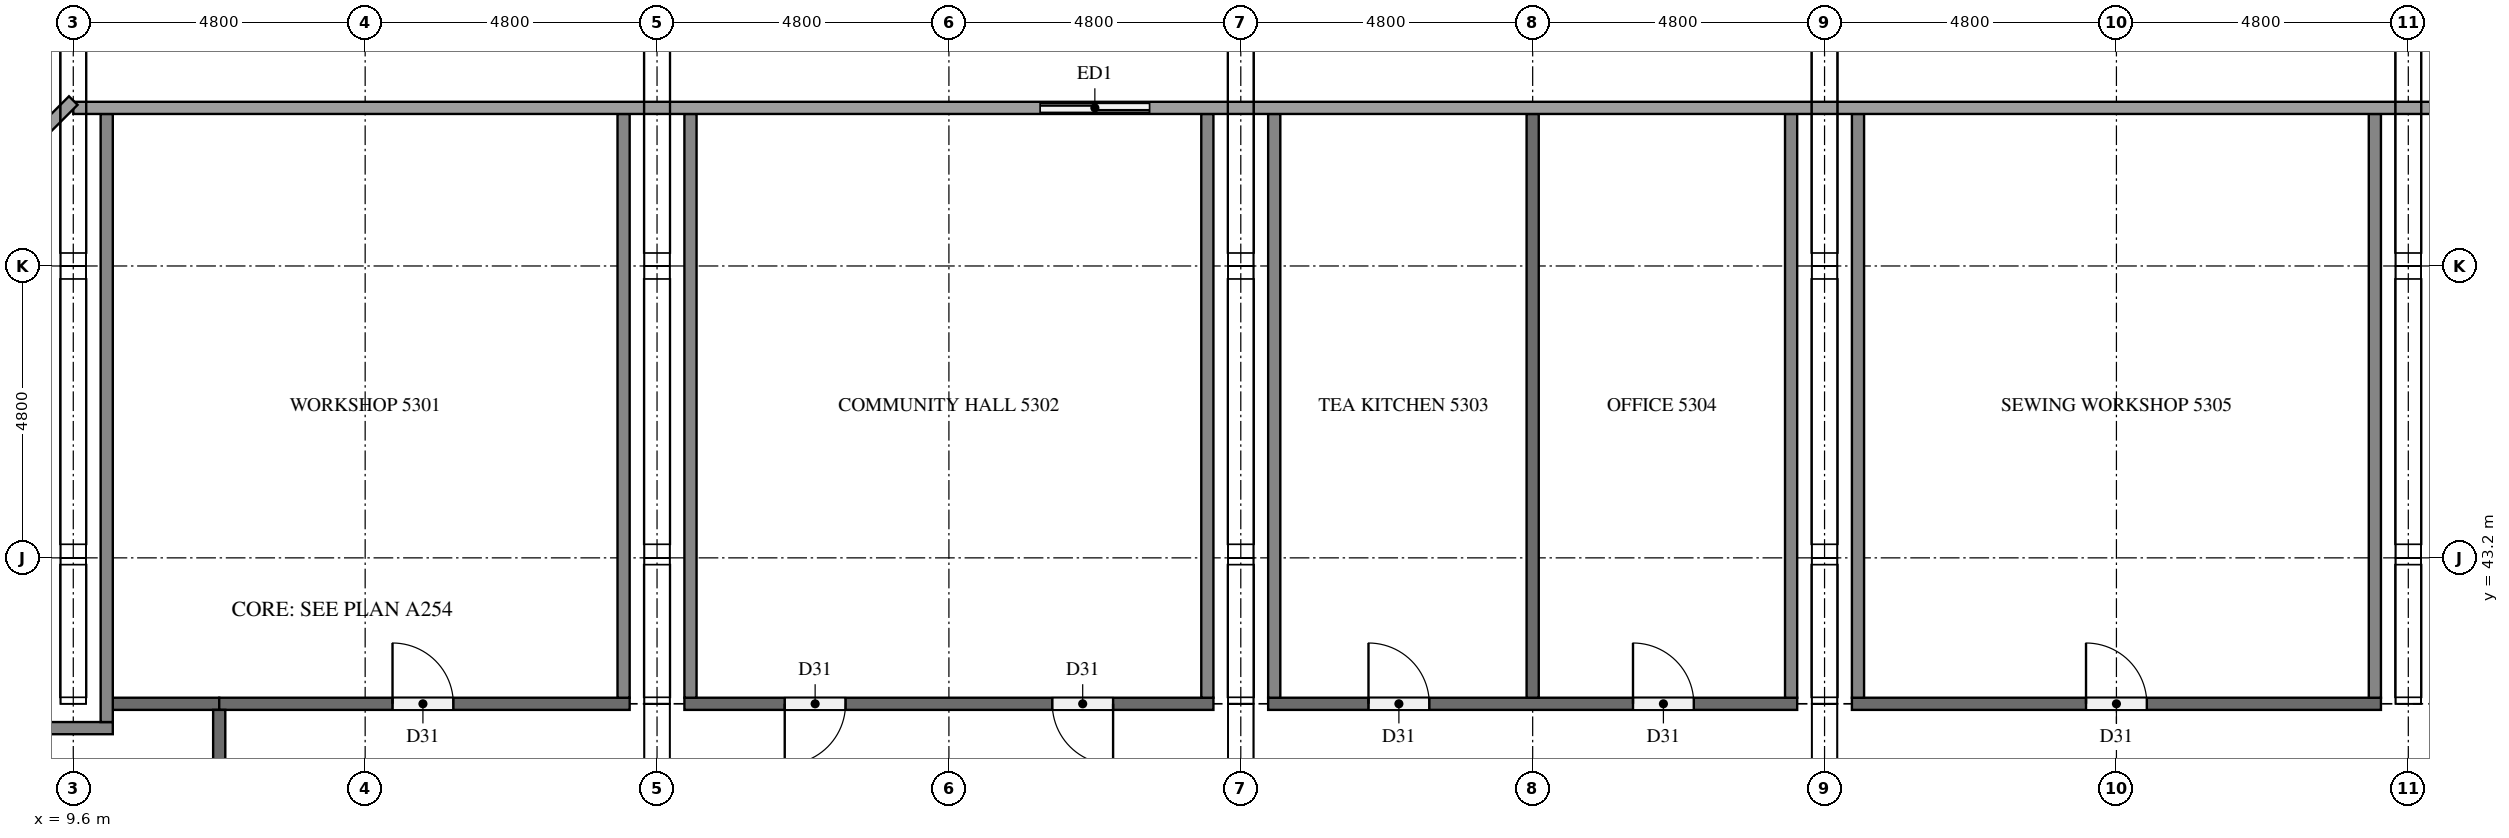
"""IFC4 building model, lengths in metres.
Left out: names, types, materials, properties, quantities, classifications, styles, units other than length and angle.
Written with IfcOpenShell. Run it as: python <this file> out.ifc"""

import sys

from ifc_helpers import new_model, si_unit, direction, frame, frame_2d, origin, place, context, subcontext, project, spatial, rectangle, extrude, element, fill, save


model = new_model("IFC4")
c1 = context("Model", 3, precision=1e-05, world=origin(), true_north=direction((0.0, 1.0)))
c2 = subcontext(c1, "Body", "Model", "MODEL_VIEW")
j1 = project(units=[si_unit("LENGTHUNIT", "METRE"), si_unit("PLANEANGLEUNIT", "RADIAN")], contexts=[c1])
p1 = place(None, origin())
s1 = spatial("IfcSite", under=j1, at=p1, CompositionType="ELEMENT")
p2 = place(p1, origin())
s2 = spatial("IfcBuilding", under=s1, at=p2, CompositionType="ELEMENT")
p3 = place(p2, frame((0.0, 0.0, 203.4)))
s3 = spatial("IfcBuildingStorey", under=s2, at=p3, CompositionType="ELEMENT", Elevation=203.4)
p4 = place(p3, frame((27.6, 50.6, 0.0), z_axis=(0.0, 0.0, 1.0), x_axis=(-1.0, 0.0, 0.0)))
e1 = element("IfcWall", 1, at=p4, inside=s3, PredefinedType="SOLIDWALL", context=c2, shape_type="SweptSolid", body=[
    extrude(rectangle(XDim=2.4, YDim=0.15, at=frame_2d((1.2, 0.0))), origin(), (0.0, 0.0, 1.0), 5.1),
])
p5 = place(p4, frame((0.3, 0.0, 0.0)))
e2 = element("IfcOpeningElement", 2, at=p5, cuts=e1, PredefinedType="OPENING", context=c2, shape_type="SweptSolid", body=[
    extrude(rectangle(XDim=1.8, YDim=2.4, at=frame_2d((0.9, 1.2))), frame((0.0, 0.085, 0.0), z_axis=(0.0, -1.0, 0.0), x_axis=(1.0, 0.0, 0.0)), (0.0, 0.0, 1.0), 0.17),
])
p6 = place(p3, frame((8.95, 40.4, 0.0), z_axis=(0.0, 0.0, 1.0), x_axis=(1.0, 0.0, 0.0)))
e3 = element("IfcWall", 3, at=p6, inside=s3, PredefinedType="PARTITIONING", context=c2, shape_type="SweptSolid", body=[
    extrude(rectangle(XDim=1.3, YDim=0.2, at=frame_2d((0.65, 0.0))), origin(), (0.0, 0.0, 1.0), 5.1),
])
p7 = place(p3, frame((10.25, 40.8, 0.0), z_axis=(0.0, 0.0, 1.0), x_axis=(1.0, 0.0, 0.0)))
e4 = element("IfcWall", 4, at=p7, inside=s3, PredefinedType="PARTITIONING", context=c2, shape_type="SweptSolid", body=[
    extrude(rectangle(XDim=1.75, YDim=0.2, at=frame_2d((0.875, 0.0))), origin(), (0.0, 0.0, 1.0), 5.1),
])
p8 = place(p3, frame((12.0, 40.8, 0.0), z_axis=(0.0, 0.0, 1.0), x_axis=(1.0, 0.0, 0.0)))
e5 = element("IfcWall", 5, at=p8, inside=s3, PredefinedType="PARTITIONING", context=c2, shape_type="SweptSolid", body=[
    extrude(rectangle(XDim=6.75, YDim=0.2, at=frame_2d((3.375, 0.0))), origin(), (0.0, 0.0, 1.0), 5.1),
])
p9 = place(p8, frame((2.85, 0.0, 0.0)))
e6 = element("IfcOpeningElement", 6, at=p9, cuts=e5, PredefinedType="OPENING", context=c2, shape_type="SweptSolid", body=[
    extrude(rectangle(XDim=1.0, YDim=2.1, at=frame_2d((0.5, 1.05))), frame((0.0, 0.11, 0.0), z_axis=(0.0, -1.0, 0.0), x_axis=(1.0, 0.0, 0.0)), (0.0, 0.0, 1.0), 0.22),
])
p10 = place(p3, frame((28.35, 40.8, 0.0), z_axis=(0.0, 0.0, 1.0), x_axis=(-1.0, 0.0, 0.0)))
e7 = element("IfcWall", 7, at=p10, inside=s3, PredefinedType="PARTITIONING", context=c2, shape_type="SweptSolid", body=[
    extrude(rectangle(XDim=8.7, YDim=0.2, at=frame_2d((4.35, 0.0))), origin(), (0.0, 0.0, 1.0), 5.1),
])
p11 = place(p10, frame((6.05, 0.0, 0.0)))
e8 = element("IfcOpeningElement", 8, at=p11, cuts=e7, PredefinedType="OPENING", context=c2, shape_type="SweptSolid", body=[
    extrude(rectangle(XDim=1.0, YDim=2.1, at=frame_2d((0.5, 1.05))), frame((0.0, 0.11, 0.0), z_axis=(0.0, -1.0, 0.0), x_axis=(1.0, 0.0, 0.0)), (0.0, 0.0, 1.0), 0.22),
])
p12 = place(p10, frame((1.65, 0.0, 0.0)))
e9 = element("IfcOpeningElement", 9, at=p12, cuts=e7, PredefinedType="OPENING", context=c2, shape_type="SweptSolid", body=[
    extrude(rectangle(XDim=1.0, YDim=2.1, at=frame_2d((0.5, 1.05))), frame((0.0, 0.11, 0.0), z_axis=(0.0, -1.0, 0.0), x_axis=(1.0, 0.0, 0.0)), (0.0, 0.0, 1.0), 0.22),
])
p13 = place(p3, frame((29.25, 40.8, 0.0), z_axis=(0.0, 0.0, 1.0), x_axis=(1.0, 0.0, 0.0)))
e10 = element("IfcWall", 10, at=p13, inside=s3, PredefinedType="PARTITIONING", context=c2, shape_type="SweptSolid", body=[
    extrude(rectangle(XDim=8.7, YDim=0.2, at=frame_2d((4.35, 0.0))), origin(), (0.0, 0.0, 1.0), 5.1),
])
p14 = place(p13, frame((1.65, 0.0, 0.0)))
e11 = element("IfcOpeningElement", 11, at=p14, cuts=e10, PredefinedType="OPENING", context=c2, shape_type="SweptSolid", body=[
    extrude(rectangle(XDim=1.0, YDim=2.1, at=frame_2d((0.5, 1.05))), frame((0.0, 0.11, 0.0), z_axis=(0.0, -1.0, 0.0), x_axis=(1.0, 0.0, 0.0)), (0.0, 0.0, 1.0), 0.22),
])
p15 = place(p13, frame((6.0, 0.0, 0.0)))
e12 = element("IfcOpeningElement", 12, at=p15, cuts=e10, PredefinedType="OPENING", context=c2, shape_type="SweptSolid", body=[
    extrude(rectangle(XDim=1.0, YDim=2.1, at=frame_2d((0.5, 1.05))), frame((0.0, 0.11, 0.0), z_axis=(0.0, -1.0, 0.0), x_axis=(1.0, 0.0, 0.0)), (0.0, 0.0, 1.0), 0.22),
])
p16 = place(p3, frame((38.85, 40.8, 0.0), z_axis=(0.0, 0.0, 1.0), x_axis=(1.0, 0.0, 0.0)))
e13 = element("IfcWall", 13, at=p16, inside=s3, PredefinedType="PARTITIONING", context=c2, shape_type="SweptSolid", body=[
    extrude(rectangle(XDim=8.7, YDim=0.2, at=frame_2d((4.35, 0.0))), origin(), (0.0, 0.0, 1.0), 5.1),
])
p17 = place(p16, frame((3.85, 0.0, 0.0)))
e14 = element("IfcOpeningElement", 14, at=p17, cuts=e13, PredefinedType="OPENING", context=c2, shape_type="SweptSolid", body=[
    extrude(rectangle(XDim=1.0, YDim=2.1, at=frame_2d((0.5, 1.05))), frame((0.0, 0.11, 0.0), z_axis=(0.0, -1.0, 0.0), x_axis=(1.0, 0.0, 0.0)), (0.0, 0.0, 1.0), 0.22),
])
p18 = place(p3, frame((10.15, 40.5, 0.0), z_axis=(0.0, 0.0, 1.0), x_axis=(0.0, 1.0, 0.0)))
e15 = element("IfcWall", 15, at=p18, inside=s3, PredefinedType="PARTITIONING", context=c2, shape_type="SweptSolid", body=[
    extrude(rectangle(XDim=10.0, YDim=0.2, at=frame_2d((5.0, 0.0))), origin(), (0.0, 0.0, 1.0), 5.1),
])
p19 = place(p3, frame((12.0, 12.1, 0.0), z_axis=(0.0, 0.0, 1.0), x_axis=(0.0, 1.0, 0.0)))
e16 = element("IfcWall", 16, at=p19, inside=s3, PredefinedType="PARTITIONING", context=c2, shape_type="SweptSolid", body=[
    extrude(rectangle(XDim=28.6, YDim=0.2, at=frame_2d((14.3, 0.0))), origin(), (0.0, 0.0, 1.0), 5.1),
])
p20 = place(p19, frame((3.05, 0.0, 0.0)))
e17 = element("IfcOpeningElement", 17, at=p20, cuts=e16, PredefinedType="OPENING", context=c2, shape_type="SweptSolid", body=[
    extrude(rectangle(XDim=1.0, YDim=2.1, at=frame_2d((0.5, 1.05))), frame((0.0, 0.11, 0.0), z_axis=(0.0, -1.0, 0.0), x_axis=(1.0, 0.0, 0.0)), (0.0, 0.0, 1.0), 0.22),
])
p21 = place(p19, frame((9.05, 0.0, 0.0)))
e18 = element("IfcOpeningElement", 18, at=p21, cuts=e16, PredefinedType="OPENING", context=c2, shape_type="SweptSolid", body=[
    extrude(rectangle(XDim=1.0, YDim=2.1, at=frame_2d((0.5, 1.05))), frame((0.0, 0.11, 0.0), z_axis=(0.0, -1.0, 0.0), x_axis=(1.0, 0.0, 0.0)), (0.0, 0.0, 1.0), 0.22),
])
p22 = place(p19, frame((16.25, 0.0, 0.0)))
e19 = element("IfcOpeningElement", 19, at=p22, cuts=e16, PredefinedType="OPENING", context=c2, shape_type="SweptSolid", body=[
    extrude(rectangle(XDim=1.0, YDim=2.1, at=frame_2d((0.5, 1.05))), frame((0.0, 0.11, 0.0), z_axis=(0.0, -1.0, 0.0), x_axis=(1.0, 0.0, 0.0)), (0.0, 0.0, 1.0), 0.22),
])
p23 = place(p19, frame((24.55, 0.0, 0.0)))
e20 = element("IfcOpeningElement", 20, at=p23, cuts=e16, PredefinedType="OPENING", context=c2, shape_type="SweptSolid", body=[
    extrude(rectangle(XDim=1.0, YDim=2.1, at=frame_2d((0.5, 1.05))), frame((0.0, 0.11, 0.0), z_axis=(0.0, -1.0, 0.0), x_axis=(1.0, 0.0, 0.0)), (0.0, 0.0, 1.0), 0.22),
])
for number, where, z_axis, x_axis in (
    (21, (18.65, 40.9, 0.0), (0.0, 0.0, 1.0), (0.0, 1.0, 0.0)),
    (22, (19.75, 40.9, 0.0), (0.0, 0.0, 1.0), (0.0, 1.0, 0.0)),
    (23, (28.25, 40.9, 0.0), (0.0, 0.0, 1.0), (0.0, 1.0, 0.0)),
    (24, (29.35, 40.9, 0.0), (0.0, 0.0, 1.0), (0.0, 1.0, 0.0)),
    (25, (33.6, 40.9, 0.0), (0.0, 0.0, 1.0), (0.0, 1.0, 0.0)),
    (26, (37.85, 40.9, 0.0), (0.0, 0.0, 1.0), (0.0, 1.0, 0.0)),
    (27, (38.95, 40.9, 0.0), (0.0, 0.0, 1.0), (0.0, 1.0, 0.0)),
    (28, (47.45, 40.9, 0.0), (0.0, 0.0, 1.0), (0.0, 1.0, 0.0)),
):
    element("IfcWall", number, at=place(p3, frame(where, z_axis=z_axis, x_axis=x_axis)), inside=s3, PredefinedType="PARTITIONING", context=c2, shape_type="SweptSolid", body=[
        extrude(rectangle(XDim=9.6, YDim=0.2, at=frame_2d((4.8, 0.0))), origin(), (0.0, 0.0, 1.0), 5.1),
    ])
p24 = place(p5, origin())
e29 = element("IfcDoor", 29, at=p24, inside=s3, OperationType="SLIDING_TO_RIGHT", PredefinedType="DOOR", context=c2, shape_type="SweptSolid", body=[
    extrude(rectangle(XDim=1.8, YDim=2.4, at=frame_2d((0.9, 1.2))), frame((0.0, 0.025, 0.0), z_axis=(0.0, -1.0, 0.0), x_axis=(1.0, 0.0, 0.0)), (0.0, 0.0, 1.0), 0.05),
])
fill(e2, e29)
p25 = place(p9, origin())
e30 = element("IfcDoor", 30, at=p25, inside=s3, OperationType="SINGLE_SWING_LEFT", PredefinedType="DOOR", context=c2, shape_type="SweptSolid", body=[
    extrude(rectangle(XDim=1.0, YDim=2.1, at=frame_2d((0.5, 1.05))), frame((0.0, 0.025, 0.0), z_axis=(0.0, -1.0, 0.0), x_axis=(1.0, 0.0, 0.0)), (0.0, 0.0, 1.0), 0.05),
])
fill(e6, e30)
p26 = place(p11, origin())
e31 = element("IfcDoor", 31, at=p26, inside=s3, OperationType="SINGLE_SWING_RIGHT", PredefinedType="DOOR", context=c2, shape_type="SweptSolid", body=[
    extrude(rectangle(XDim=1.0, YDim=2.1, at=frame_2d((0.5, 1.05))), frame((0.0, 0.025, 0.0), z_axis=(0.0, -1.0, 0.0), x_axis=(1.0, 0.0, 0.0)), (0.0, 0.0, 1.0), 0.05),
])
fill(e8, e31)
p27 = place(p12, origin())
e32 = element("IfcDoor", 32, at=p27, inside=s3, OperationType="SINGLE_SWING_LEFT", PredefinedType="DOOR", context=c2, shape_type="SweptSolid", body=[
    extrude(rectangle(XDim=1.0, YDim=2.1, at=frame_2d((0.5, 1.05))), frame((0.0, 0.025, 0.0), z_axis=(0.0, -1.0, 0.0), x_axis=(1.0, 0.0, 0.0)), (0.0, 0.0, 1.0), 0.05),
])
fill(e9, e32)
p28 = place(p14, origin())
e33 = element("IfcDoor", 33, at=p28, inside=s3, OperationType="SINGLE_SWING_LEFT", PredefinedType="DOOR", context=c2, shape_type="SweptSolid", body=[
    extrude(rectangle(XDim=1.0, YDim=2.1, at=frame_2d((0.5, 1.05))), frame((0.0, 0.025, 0.0), z_axis=(0.0, -1.0, 0.0), x_axis=(1.0, 0.0, 0.0)), (0.0, 0.0, 1.0), 0.05),
])
fill(e11, e33)
p29 = place(p15, origin())
e34 = element("IfcDoor", 34, at=p29, inside=s3, OperationType="SINGLE_SWING_LEFT", PredefinedType="DOOR", context=c2, shape_type="SweptSolid", body=[
    extrude(rectangle(XDim=1.0, YDim=2.1, at=frame_2d((0.5, 1.05))), frame((0.0, 0.025, 0.0), z_axis=(0.0, -1.0, 0.0), x_axis=(1.0, 0.0, 0.0)), (0.0, 0.0, 1.0), 0.05),
])
fill(e12, e34)
p30 = place(p17, origin())
e35 = element("IfcDoor", 35, at=p30, inside=s3, OperationType="SINGLE_SWING_LEFT", PredefinedType="DOOR", context=c2, shape_type="SweptSolid", body=[
    extrude(rectangle(XDim=1.0, YDim=2.1, at=frame_2d((0.5, 1.05))), frame((0.0, 0.025, 0.0), z_axis=(0.0, -1.0, 0.0), x_axis=(1.0, 0.0, 0.0)), (0.0, 0.0, 1.0), 0.05),
])
fill(e14, e35)
save(model, sys.argv[1])
